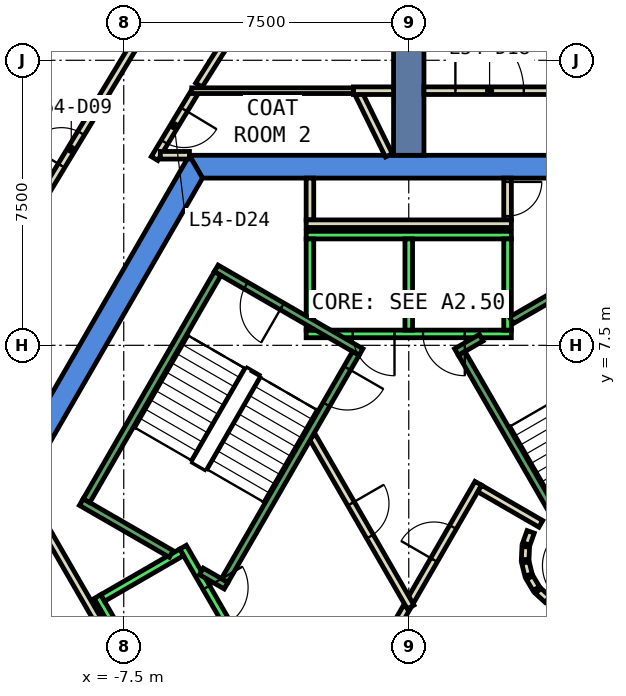
"""IFC4 building model, lengths in metres.
Left out: names, types, materials, properties, quantities, classifications, styles, units other than length and angle.
Written with IfcOpenShell. Run it as: python <this file> out.ifc"""

import sys

from ifc_helpers import new_model, si_unit, direction, frame, frame_2d, origin, place, context, subcontext, project, spatial, polyline, rectangle, outline, extrude, element, fill, save


model = new_model("IFC4")
c1 = context("Model", 3, precision=1e-05, world=origin(), true_north=direction((0.0, 1.0)))
c2 = subcontext(c1, "Body", "Model", "MODEL_VIEW")
j1 = project(units=[si_unit("LENGTHUNIT", "METRE"), si_unit("PLANEANGLEUNIT", "RADIAN")], contexts=[c1])
p1 = place(None, origin())
s1 = spatial("IfcSite", under=j1, at=p1, CompositionType="ELEMENT")
p2 = place(p1, origin())
s2 = spatial("IfcBuilding", under=s1, at=p2, CompositionType="ELEMENT")
p3 = place(p2, frame((0.0, 0.0, 241.4)))
s3 = spatial("IfcBuildingStorey", under=s2, at=p3, CompositionType="ELEMENT", Elevation=241.4)
p4 = place(p3, frame((0.0, 0.0, -0.6)))
e1 = element("IfcWall", 1, at=p4, inside=s3, PredefinedType="SHEAR", context=c2, shape_type="SweptSolid", body=[
    extrude(outline(polyline([(5.774, 12.5), (-5.774, 12.5), (-5.427, 11.9), (5.427, 11.9), (5.774, 12.5)])), origin(), (0.0, 0.0, 1.0), 3.86),
])
p5 = place(p3, frame((0.0, 0.0, -0.6)))
e2 = element("IfcWall", 2, at=p5, inside=s3, PredefinedType="SHEAR", context=c2, shape_type="SweptSolid", body=[
    extrude(outline(polyline([(-10.535, 4.253), (-10.015, 3.953), (-5.427, 11.9), (-5.774, 12.5), (-10.535, 4.253)])), origin(), (0.0, 0.0, 1.0), 3.86),
])
p6 = place(p3, frame((0.0, 0.0, -0.6)))
e3 = element("IfcWall", 3, at=p6, inside=s3, PredefinedType="SHEAR", context=c2, shape_type="SweptSolid", body=[
    extrude(outline(polyline([(-11.547, 2.5), (-5.774, -7.5), (-5.427, -6.9), (-10.854, 2.5), (-11.547, 2.5)])), origin(), (0.0, 0.0, 1.0), 3.86),
])
p7 = place(p3, frame((0.0, 12.5, -0.6), z_axis=(0.0, 0.0, 1.0), x_axis=(0.0, 1.0, 0.0)))
e4 = element("IfcWall", 4, at=p7, inside=s3, PredefinedType="SHEAR", context=c2, shape_type="SweptSolid", body=[
    extrude(rectangle(XDim=9.0, YDim=0.8, at=frame_2d((4.5, 0.0))), origin(), (0.0, 0.0, 1.0), 3.86),
])
p8 = place(p3, frame((-0.523, 12.5, 0.0), z_axis=(0.0, 0.0, 1.0), x_axis=(-0.440503659888, 0.897750814884, 0.0)))
e5 = element("IfcWall", 5, at=p8, inside=s3, PredefinedType="PARTITIONING", context=c2, shape_type="SweptSolid", body=[
    extrude(rectangle(XDim=1.793, YDim=0.2, at=frame_2d((0.897, 0.0))), origin(), (0.0, 0.0, 1.0), 3.26),
])
p9 = place(p3, frame((-5.65, 14.136, 0.0), z_axis=(0.0, 0.0, 1.0), x_axis=(-0.516869099034, -0.856064445275, 0.0)))
e6 = element("IfcWall", 6, at=p9, inside=s3, PredefinedType="PARTITIONING", context=c2, shape_type="SweptSolid", body=[
    extrude(rectangle(XDim=2.01, YDim=0.2, at=frame_2d((1.005, 0.0))), origin(), (0.0, 0.0, 1.0), 3.26),
])
p10 = place(p9, frame((0.505, 0.0, 0.0)))
e7 = element("IfcOpeningElement", 7, at=p10, cuts=e6, PredefinedType="OPENING", context=c2, shape_type="SweptSolid", body=[
    extrude(rectangle(XDim=1.0, YDim=2.1, at=frame_2d((0.5, 1.05))), frame((0.0, 0.11, 0.0), z_axis=(0.0, -1.0, 0.0), x_axis=(1.0, 0.0, 0.0)), (0.0, 0.0, 1.0), 0.22),
])
p11 = place(p3, frame((-6.537, 12.501, 0.0), z_axis=(0.0, 0.0, 1.0), x_axis=(1.0, 0.0, 0.0)))
e8 = element("IfcWall", 8, at=p11, inside=s3, PredefinedType="PARTITIONING", context=c2, shape_type="SweptSolid", body=[
    extrude(rectangle(XDim=0.766, YDim=0.2, at=frame_2d((0.383, 0.0))), origin(), (0.0, 0.0, 1.0), 3.26),
])
p12 = place(p3, frame((-1.457, 14.2, 0.0), z_axis=(0.0, 0.0, 1.0), x_axis=(1.0, 0.0, 0.0)))
e9 = element("IfcWall", 9, at=p12, inside=s3, PredefinedType="PARTITIONING", context=c2, shape_type="SweptSolid", body=[
    extrude(rectangle(XDim=1.057, YDim=0.2, at=frame_2d((0.529, 0.0))), origin(), (0.0, 0.0, 1.0), 3.26),
])
for number, where, z_axis, x_axis in (
    (10, (5.522, 14.348, 0.0), (0.0, 0.0, 1.0), (-0.534, 0.845, 0.0)),
    (11, (-2.516, 19.106, 0.0), (0.0, 0.0, 1.0), (-0.534, -0.845, 0.0)),
):
    element("IfcWall", number, at=place(p3, frame(where, z_axis=z_axis, x_axis=x_axis)), inside=s3, PredefinedType="PARTITIONING", context=c2, shape_type="SweptSolid", body=[
        extrude(rectangle(XDim=5.628, YDim=0.2, at=frame_2d((2.814, 0.0))), origin(), (0.0, 0.0, 1.0), 3.26),
    ])
p13 = place(p3, frame((-10.576, 9.849, 0.0), z_axis=(0.0, 0.0, 1.0), x_axis=(0.517026085378, 0.855969641423, 0.0)))
e12 = element("IfcWall", 12, at=p13, inside=s3, PredefinedType="PARTITIONING", context=c2, shape_type="SweptSolid", body=[
    extrude(rectangle(XDim=6.408, YDim=0.2, at=frame_2d((3.204, 0.0))), origin(), (0.0, 0.0, 1.0), 3.26),
])
p14 = place(p13, frame((2.779, 0.0, 0.0)))
e13 = element("IfcOpeningElement", 13, at=p14, cuts=e12, PredefinedType="OPENING", context=c2, shape_type="SweptSolid", body=[
    extrude(rectangle(XDim=1.0, YDim=2.1, at=frame_2d((0.5, 1.05))), frame((0.0, 0.11, 0.0), z_axis=(0.0, -1.0, 0.0), x_axis=(1.0, 0.0, 0.0)), (0.0, 0.0, 1.0), 0.22),
])
p15 = place(p3, frame((-2.6, 10.8, 0.0), z_axis=(0.0, 0.0, 1.0), x_axis=(0.0, 1.0, 0.0)))
e14 = element("IfcWall", 14, at=p15, inside=s3, PredefinedType="PARTITIONING", context=c2, shape_type="SweptSolid", body=[
    extrude(rectangle(XDim=1.1, YDim=0.2, at=frame_2d((0.55, 0.0))), origin(), (0.0, 0.0, 1.0), 3.26),
])
p16 = place(p3, frame((2.6, 11.9, 0.0), z_axis=(0.0, 0.0, 1.0), x_axis=(0.0, -1.0, 0.0)))
e15 = element("IfcWall", 15, at=p16, inside=s3, PredefinedType="PARTITIONING", context=c2, shape_type="SweptSolid", body=[
    extrude(rectangle(XDim=1.1, YDim=0.2, at=frame_2d((0.55, 0.0))), origin(), (0.0, 0.0, 1.0), 3.26),
])
p17 = place(p16, frame((0.1, 0.0, 0.0)))
e16 = element("IfcOpeningElement", 16, at=p17, cuts=e15, PredefinedType="OPENING", context=c2, shape_type="SweptSolid", body=[
    extrude(rectangle(XDim=0.9, YDim=2.1, at=frame_2d((0.45, 1.05))), frame((0.0, 0.11, 0.0), z_axis=(0.0, -1.0, 0.0), x_axis=(1.0, 0.0, 0.0)), (0.0, 0.0, 1.0), 0.22),
])
p18 = place(p3, frame((2.7, 10.7, 0.0), z_axis=(0.0, 0.0, 1.0), x_axis=(-1.0, 0.0, 0.0)))
e17 = element("IfcWall", 17, at=p18, inside=s3, PredefinedType="PARTITIONING", context=c2, shape_type="SweptSolid", body=[
    extrude(rectangle(XDim=5.4, YDim=0.2, at=frame_2d((2.7, 0.0))), origin(), (0.0, 0.0, 1.0), 3.26),
])
p19 = place(p3, frame((-9.751, 2.99, 0.0), z_axis=(0.0, 0.0, 1.0), x_axis=(0.500012163284, -0.866018381195, 0.0)))
e18 = element("IfcWall", 18, at=p19, inside=s3, PredefinedType="PARTITIONING", context=c2, shape_type="SweptSolid", body=[
    extrude(rectangle(XDim=8.0, YDim=0.2, at=frame_2d((4.0, 0.0))), origin(), (0.0, 0.0, 1.0), 3.26),
])
p20 = place(p3, frame((-1.457, 14.2, 0.0), z_axis=(0.0, 0.0, 1.0), x_axis=(-1.0, 0.0, 0.0)))
e19 = element("IfcWall", 19, at=p20, inside=s3, PredefinedType="PARTITIONING", context=c2, shape_type="SweptSolid", body=[
    extrude(rectangle(XDim=4.254, YDim=0.15, at=frame_2d((2.127, 0.0))), origin(), (0.0, 0.0, 1.0), 3.26),
])
p21 = place(p3, frame((-0.982, -1.0, 0.0), z_axis=(0.0, 0.0, 1.0), x_axis=(0.50024047865, 0.865886518847, 0.0)))
e20 = element("IfcWall", 20, at=p21, inside=s3, PredefinedType="PARTITIONING", context=c2, shape_type="SweptSolid", body=[
    extrude(rectangle(XDim=1.863, YDim=0.2, at=frame_2d((0.931, 0.0))), origin(), (0.0, 0.0, 1.0), 3.26),
])
p22 = place(p3, frame((0.05, 0.787, 0.0), z_axis=(0.0, 0.0, 1.0), x_axis=(0.499954076797, 0.866051915934, 0.0)))
e21 = element("IfcWall", 21, at=p22, inside=s3, PredefinedType="PARTITIONING", context=c2, shape_type="SweptSolid", body=[
    extrude(rectangle(XDim=3.558, YDim=0.2, at=frame_2d((1.779, 0.0))), origin(), (0.0, 0.0, 1.0), 3.26),
])
p23 = place(p22, frame((1.229, 0.0, 0.0)))
e22 = element("IfcOpeningElement", 22, at=p23, cuts=e21, PredefinedType="OPENING", context=c2, shape_type="SweptSolid", body=[
    extrude(rectangle(XDim=1.0, YDim=2.1, at=frame_2d((0.5, 1.05))), frame((0.0, 0.11, 0.0), z_axis=(0.0, -1.0, 0.0), x_axis=(1.0, 0.0, 0.0)), (0.0, 0.0, 1.0), 0.22),
])
p24 = place(p3, frame((1.866, 3.732, 0.0), z_axis=(0.0, 0.0, 1.0), x_axis=(0.866043361281, -0.499968895414, 0.0)))
e23 = element("IfcWall", 23, at=p24, inside=s3, PredefinedType="PARTITIONING", context=c2, shape_type="SweptSolid", body=[
    extrude(rectangle(XDim=1.858, YDim=0.2, at=frame_2d((0.929, 0.0))), origin(), (0.0, 0.0, 1.0), 3.26),
])
p25 = place(p3, frame((3.208, 2.592, 0.0), z_axis=(0.0, 0.0, 1.0), x_axis=(-0.337388820924, -0.941365382578, 0.0)))
e24 = element("IfcWall", 24, at=p25, inside=s3, PredefinedType="PARTITIONING", context=c2, shape_type="SweptSolid", body=[
    extrude(rectangle(XDim=0.338, YDim=0.2, at=frame_2d((0.169, 0.0))), origin(), (0.0, 0.0, 1.0), 3.26),
])
p26 = place(p3, frame((3.079, 2.199, 0.0), z_axis=(0.0, 0.0, 1.0), x_axis=(-0.047771483479, -0.998858290933, 0.0)))
e25 = element("IfcWall", 25, at=p26, inside=s3, PredefinedType="PARTITIONING", context=c2, shape_type="SweptSolid", body=[
    extrude(rectangle(XDim=0.337, YDim=0.2, at=frame_2d((0.169, 0.0))), origin(), (0.0, 0.0, 1.0), 3.26),
])
p27 = place(p3, frame((3.07, 1.786, 0.0), z_axis=(0.0, 0.0, 1.0), x_axis=(0.242705583207, -0.970099994784, 0.0)))
e26 = element("IfcWall", 26, at=p27, inside=s3, PredefinedType="PARTITIONING", context=c2, shape_type="SweptSolid", body=[
    extrude(rectangle(XDim=0.338, YDim=0.2, at=frame_2d((0.169, 0.0))), origin(), (0.0, 0.0, 1.0), 3.26),
])
for number, where, z_axis, x_axis in (
    (27, (3.182, 1.388, 0.0), (0.0, 0.0, 1.0), (0.512, -0.859, 0.0)),
    (28, (3.404, 1.039, 0.0), (0.0, 0.0, 1.0), (0.74, -0.672, 0.0)),
):
    element("IfcWall", number, at=place(p3, frame(where, z_axis=z_axis, x_axis=x_axis)), inside=s3, PredefinedType="PARTITIONING", context=c2, shape_type="SweptSolid", body=[
        extrude(rectangle(XDim=0.338, YDim=0.2, at=frame_2d((0.169, 0.0))), origin(), (0.0, 0.0, 1.0), 3.26),
    ])
p28 = place(p3, frame((-2.54, 5.1, 0.0), z_axis=(0.0, 0.0, 1.0), x_axis=(0.499925051871, -0.866068670783, 0.0)))
e29 = element("IfcWall", 29, at=p28, inside=s3, PredefinedType="PARTITIONING", context=c2, shape_type="SweptSolid", body=[
    extrude(rectangle(XDim=5.181, YDim=0.2, at=frame_2d((2.59, 0.0))), origin(), (0.0, 0.0, 1.0), 3.26),
])
p29 = place(p28, frame((2.04, 0.0, 0.0)))
e30 = element("IfcOpeningElement", 30, at=p29, cuts=e29, PredefinedType="OPENING", context=c2, shape_type="SweptSolid", body=[
    extrude(rectangle(XDim=1.0, YDim=2.1, at=frame_2d((0.5, 1.05))), frame((0.0, 0.11, 0.0), z_axis=(0.0, -1.0, 0.0), x_axis=(1.0, 0.0, 0.0)), (0.0, 0.0, 1.0), 0.22),
])
p30 = place(p3, frame((0.4, 14.2, 0.0), z_axis=(0.0, 0.0, 1.0), x_axis=(1.0, 0.0, 0.0)))
e31 = element("IfcWall", 31, at=p30, inside=s3, PredefinedType="PARTITIONING", context=c2, shape_type="SweptSolid", body=[
    extrude(rectangle(XDim=5.311, YDim=0.2, at=frame_2d((2.656, 0.0))), origin(), (0.0, 0.0, 1.0), 3.26),
])
p31 = place(p30, frame((0.827, 0.0, 0.0)))
e32 = element("IfcOpeningElement", 32, at=p31, cuts=e31, PredefinedType="OPENING", context=c2, shape_type="SweptSolid", body=[
    extrude(rectangle(XDim=1.8, YDim=2.1, at=frame_2d((0.9, 1.05))), frame((0.0, 0.11, 0.0), z_axis=(0.0, -1.0, 0.0), x_axis=(1.0, 0.0, 0.0)), (0.0, 0.0, 1.0), 0.22),
])
p32 = place(p3, frame((2.7, 7.8, 0.0), z_axis=(0.0, 0.0, 1.0), x_axis=(-1.0, 0.0, 0.0)))
e33 = element("IfcWall", 33, at=p32, inside=s3, PredefinedType="STANDARD", context=c2, shape_type="SweptSolid", body=[
    extrude(rectangle(XDim=5.4, YDim=0.2, at=frame_2d((2.7, 0.0))), origin(), (0.0, 0.0, 1.0), 3.26),
])
p33 = place(p32, frame((1.225, 0.0, 0.0)))
e34 = element("IfcOpeningElement", 34, at=p33, cuts=e33, PredefinedType="OPENING", context=c2, shape_type="SweptSolid", body=[
    extrude(rectangle(XDim=1.1, YDim=2.1, at=frame_2d((0.55, 1.05))), frame((0.0, 0.11, 0.0), z_axis=(0.0, -1.0, 0.0), x_axis=(1.0, 0.0, 0.0)), (0.0, 0.0, 1.0), 0.22),
])
p34 = place(p32, frame((3.075, 0.0, 0.0)))
e35 = element("IfcOpeningElement", 35, at=p34, cuts=e33, PredefinedType="OPENING", context=c2, shape_type="SweptSolid", body=[
    extrude(rectangle(XDim=1.1, YDim=2.1, at=frame_2d((0.55, 1.05))), frame((0.0, 0.11, 0.0), z_axis=(0.0, -1.0, 0.0), x_axis=(1.0, 0.0, 0.0)), (0.0, 0.0, 1.0), 0.22),
])
p35 = place(p3, frame((2.7, 10.4, 0.0), z_axis=(0.0, 0.0, 1.0), x_axis=(-1.0, 0.0, 0.0)))
e36 = element("IfcWall", 36, at=p35, inside=s3, PredefinedType="STANDARD", context=c2, shape_type="SweptSolid", body=[
    extrude(rectangle(XDim=5.4, YDim=0.2, at=frame_2d((2.7, 0.0))), origin(), (0.0, 0.0, 1.0), 3.26),
])
for number, where, z_axis, x_axis in (
    (37, (2.6, 7.9, 0.0), (0.0, 0.0, 1.0), (0.0, 1.0, 0.0)),
    (38, (0.0, 7.9, 0.0), (0.0, 0.0, 1.0), (0.0, 1.0, 0.0)),
    (39, (-2.6, 7.9, 0.0), (0.0, 0.0, 1.0), (0.0, 1.0, 0.0)),
):
    element("IfcWall", number, at=place(p3, frame(where, z_axis=z_axis, x_axis=x_axis)), inside=s3, PredefinedType="STANDARD", context=c2, shape_type="SweptSolid", body=[
        extrude(rectangle(XDim=2.4, YDim=0.2, at=frame_2d((1.2, 0.0))), origin(), (0.0, 0.0, 1.0), 3.26),
    ])
p36 = place(p3, frame((-5.94, 2.188, 0.0), z_axis=(0.0, 0.0, 1.0), x_axis=(0.500034260056, -0.866005622828, 0.0)))
e40 = element("IfcWall", 40, at=p36, inside=s3, PredefinedType="STANDARD", context=c2, shape_type="SweptSolid", body=[
    extrude(rectangle(XDim=5.399, YDim=0.2, at=frame_2d((2.7, 0.0))), origin(), (0.0, 0.0, 1.0), 3.26),
])
p37 = place(p36, frame((3.075, 0.0, 0.0)))
e41 = element("IfcOpeningElement", 41, at=p37, cuts=e40, PredefinedType="OPENING", context=c2, shape_type="SweptSolid", body=[
    extrude(rectangle(XDim=1.1, YDim=2.1, at=frame_2d((0.55, 1.05))), frame((0.0, 0.11, 0.0), z_axis=(0.0, -1.0, 0.0), x_axis=(1.0, 0.0, 0.0)), (0.0, 0.0, 1.0), 0.22),
])
p38 = place(p36, frame((1.225, 0.0, 0.0)))
e42 = element("IfcOpeningElement", 42, at=p38, cuts=e40, PredefinedType="OPENING", context=c2, shape_type="SweptSolid", body=[
    extrude(rectangle(XDim=1.1, YDim=2.1, at=frame_2d((0.55, 1.05))), frame((0.0, 0.11, 0.0), z_axis=(0.0, -1.0, 0.0), x_axis=(1.0, 0.0, 0.0)), (0.0, 0.0, 1.0), 0.22),
])
p39 = place(p3, frame((-8.192, 0.888, 0.0), z_axis=(0.0, 0.0, 1.0), x_axis=(0.500034260056, -0.866005622828, 0.0)))
e43 = element("IfcWall", 43, at=p39, inside=s3, PredefinedType="STANDARD", context=c2, shape_type="SweptSolid", body=[
    extrude(rectangle(XDim=5.399, YDim=0.2, at=frame_2d((2.7, 0.0))), origin(), (0.0, 0.0, 1.0), 3.26),
])
p40 = place(p3, frame((-5.977, 2.052, 0.0), z_axis=(0.0, 0.0, 1.0), x_axis=(-0.865973769406, -0.500089422704, 0.0)))
e44 = element("IfcWall", 44, at=p40, inside=s3, PredefinedType="STANDARD", context=c2, shape_type="SweptSolid", body=[
    extrude(rectangle(XDim=2.399, YDim=0.2, at=frame_2d((1.2, 0.0))), origin(), (0.0, 0.0, 1.0), 3.26),
])
p41 = place(p3, frame((3.24, -2.488, 0.0), z_axis=(0.0, 0.0, 1.0), x_axis=(0.500034260056, 0.866005622828, 0.0)))
e45 = element("IfcWall", 45, at=p41, inside=s3, PredefinedType="STANDARD", context=c2, shape_type="SweptSolid", body=[
    extrude(rectangle(XDim=5.399, YDim=0.2, at=frame_2d((2.7, 0.0))), origin(), (0.0, 0.0, 1.0), 3.26),
])
p42 = place(p41, frame((3.225, 0.0, 0.0)))
e46 = element("IfcOpeningElement", 46, at=p42, cuts=e45, PredefinedType="OPENING", context=c2, shape_type="SweptSolid", body=[
    extrude(rectangle(XDim=1.1, YDim=2.1, at=frame_2d((0.55, 1.05))), frame((0.0, 0.11, 0.0), z_axis=(0.0, -1.0, 0.0), x_axis=(1.0, 0.0, 0.0)), (0.0, 0.0, 1.0), 0.22),
])
p43 = place(p41, frame((1.225, 0.0, 0.0)))
e47 = element("IfcOpeningElement", 47, at=p43, cuts=e45, PredefinedType="OPENING", context=c2, shape_type="SweptSolid", body=[
    extrude(rectangle(XDim=1.1, YDim=2.1, at=frame_2d((0.55, 1.05))), frame((0.0, 0.11, 0.0), z_axis=(0.0, -1.0, 0.0), x_axis=(1.0, 0.0, 0.0)), (0.0, 0.0, 1.0), 0.22),
])
p44 = place(p3, frame((2.7, 8.158, 0.0), z_axis=(0.0, 0.0, 1.0), x_axis=(0.86611865017, 0.499838457731, 0.0)))
e48 = element("IfcWall", 48, at=p44, inside=s3, PredefinedType="STANDARD", context=c2, shape_type="SweptSolid", body=[
    extrude(rectangle(XDim=2.733, YDim=0.2, at=frame_2d((1.366, 0.0))), origin(), (0.0, 0.0, 1.0), 3.26),
])
p45 = place(p3, frame((1.256, 7.324, 0.0), z_axis=(0.0, 0.0, 1.0), x_axis=(0.865915093549, 0.500191014278, 0.0)))
e49 = element("IfcWall", 49, at=p45, inside=s3, PredefinedType="STANDARD", context=c2, shape_type="SweptSolid", body=[
    extrude(rectangle(XDim=0.752, YDim=0.2, at=frame_2d((0.376, 0.0))), origin(), (0.0, 0.0, 1.0), 3.26),
])
p46 = place(p3, frame((4.843, 1.312, 0.0), z_axis=(0.0, 0.0, 1.0), x_axis=(-0.499963383562, 0.866046543262, 0.0)))
e50 = element("IfcWall", 50, at=p46, inside=s3, PredefinedType="STANDARD", context=c2, shape_type="SweptSolid", body=[
    extrude(rectangle(XDim=6.9, YDim=0.2, at=frame_2d((3.45, 0.0))), origin(), (0.0, 0.0, 1.0), 3.26),
])
p47 = place(p46, frame((0.45, 0.0, 0.0)))
e51 = element("IfcOpeningElement", 51, at=p47, cuts=e50, PredefinedType="OPENING", context=c2, shape_type="SweptSolid", body=[
    extrude(rectangle(XDim=1.1, YDim=2.2, at=frame_2d((0.55, 1.1))), frame((0.0, 0.11, 0.0), z_axis=(0.0, -1.0, 0.0), x_axis=(1.0, 0.0, 0.0)), (0.0, 0.0, 1.0), 0.22),
])
p48 = place(p3, frame((-1.256, 7.324, 0.0), z_axis=(0.0, 0.0, 1.0), x_axis=(-0.866046073146, 0.499964197906, 0.0)))
e52 = element("IfcWall", 52, at=p48, inside=s3, PredefinedType="STANDARD", context=c2, shape_type="SweptSolid", body=[
    extrude(rectangle(XDim=4.4, YDim=0.2, at=frame_2d((2.2, 0.0))), origin(), (0.0, 0.0, 1.0), 3.26),
])
p49 = place(p48, frame((2.4, 0.0, 0.0)))
e53 = element("IfcOpeningElement", 53, at=p49, cuts=e52, PredefinedType="OPENING", context=c2, shape_type="SweptSolid", body=[
    extrude(rectangle(XDim=1.1, YDim=2.2, at=frame_2d((0.55, 1.1))), frame((0.0, 0.11, 0.0), z_axis=(0.0, -1.0, 0.0), x_axis=(1.0, 0.0, 0.0)), (0.0, 0.0, 1.0), 0.22),
])
p50 = place(p3, frame((-6.25, 2.01, 0.0), z_axis=(0.0, 0.0, 1.0), x_axis=(-0.86611865017, 0.499838457731, 0.0)))
e54 = element("IfcWall", 54, at=p50, inside=s3, PredefinedType="STANDARD", context=c2, shape_type="SweptSolid", body=[
    extrude(rectangle(XDim=2.733, YDim=0.2, at=frame_2d((1.366, 0.0))), origin(), (0.0, 0.0, 1.0), 3.26),
])
p51 = place(p3, frame((-4.806, 1.176, 0.0), z_axis=(0.0, 0.0, 1.0), x_axis=(-0.866558586415, 0.499075361355, 0.0)))
e55 = element("IfcWall", 55, at=p51, inside=s3, PredefinedType="STANDARD", context=c2, shape_type="SweptSolid", body=[
    extrude(rectangle(XDim=0.751, YDim=0.2, at=frame_2d((0.376, 0.0))), origin(), (0.0, 0.0, 1.0), 3.26),
])
p52 = place(p3, frame((-1.393, 7.288, 0.0), z_axis=(0.0, 0.0, 1.0), x_axis=(-0.499963383562, -0.866046543262, 0.0)))
e56 = element("IfcWall", 56, at=p52, inside=s3, PredefinedType="STANDARD", context=c2, shape_type="SweptSolid", body=[
    extrude(rectangle(XDim=6.9, YDim=0.2, at=frame_2d((3.45, 0.0))), origin(), (0.0, 0.0, 1.0), 3.26),
])
p53 = place(p52, frame((0.45, 0.0, 0.0)))
e57 = element("IfcOpeningElement", 57, at=p53, cuts=e56, PredefinedType="OPENING", context=c2, shape_type="SweptSolid", body=[
    extrude(rectangle(XDim=1.1, YDim=2.2, at=frame_2d((0.55, 1.1))), frame((0.0, 0.11, 0.0), z_axis=(0.0, -1.0, 0.0), x_axis=(1.0, 0.0, 0.0)), (0.0, 0.0, 1.0), 0.22),
])
p54 = place(p3, frame((-5.03, 9.388, 0.0), z_axis=(0.0, 0.0, 1.0), x_axis=(-0.499978703459, -0.866037698999, 0.0)))
e58 = element("IfcWall", 58, at=p54, inside=s3, PredefinedType="STANDARD", context=c2, shape_type="SweptSolid", body=[
    extrude(rectangle(XDim=6.9, YDim=0.2, at=frame_2d((3.45, 0.0))), origin(), (0.0, 0.0, 1.0), 3.26),
])
p55 = place(p14, origin())
e59 = element("IfcDoor", 59, at=p55, inside=s3, OperationType="SINGLE_SWING_LEFT", PredefinedType="DOOR", context=c2, shape_type="SweptSolid", body=[
    extrude(rectangle(XDim=1.0, YDim=2.1, at=frame_2d((0.5, 1.05))), frame((0.0, 0.025, 0.0), z_axis=(0.0, -1.0, 0.0), x_axis=(1.0, 0.0, 0.0)), (0.0, 0.0, 1.0), 0.05),
])
fill(e13, e59)
p56 = place(p31, origin())
e60 = element("IfcDoor", 60, at=p56, inside=s3, OperationType="DOUBLE_DOOR_SINGLE_SWING", PredefinedType="DOOR", context=c2, shape_type="SweptSolid", body=[
    extrude(rectangle(XDim=1.8, YDim=2.1, at=frame_2d((0.9, 1.05))), frame((0.0, 0.025, 0.0), z_axis=(0.0, -1.0, 0.0), x_axis=(1.0, 0.0, 0.0)), (0.0, 0.0, 1.0), 0.05),
])
fill(e32, e60)
p57 = place(p10, origin())
e61 = element("IfcDoor", 61, at=p57, inside=s3, OperationType="SINGLE_SWING_LEFT", PredefinedType="DOOR", context=c2, shape_type="SweptSolid", body=[
    extrude(rectangle(XDim=1.0, YDim=2.1, at=frame_2d((0.5, 1.05))), frame((0.0, 0.025, 0.0), z_axis=(0.0, -1.0, 0.0), x_axis=(1.0, 0.0, 0.0)), (0.0, 0.0, 1.0), 0.05),
])
fill(e7, e61)
p58 = place(p23, origin())
e62 = element("IfcDoor", 62, at=p58, inside=s3, OperationType="SINGLE_SWING_RIGHT", PredefinedType="DOOR", context=c2, shape_type="SweptSolid", body=[
    extrude(rectangle(XDim=1.0, YDim=2.1, at=frame_2d((0.5, 1.05))), frame((0.0, 0.025, 0.0), z_axis=(0.0, -1.0, 0.0), x_axis=(1.0, 0.0, 0.0)), (0.0, 0.0, 1.0), 0.05),
])
fill(e22, e62)
p59 = place(p29, origin())
e63 = element("IfcDoor", 63, at=p59, inside=s3, OperationType="SINGLE_SWING_RIGHT", PredefinedType="DOOR", context=c2, shape_type="SweptSolid", body=[
    extrude(rectangle(XDim=1.0, YDim=2.1, at=frame_2d((0.5, 1.05))), frame((0.0, 0.025, 0.0), z_axis=(0.0, -1.0, 0.0), x_axis=(1.0, 0.0, 0.0)), (0.0, 0.0, 1.0), 0.05),
])
fill(e30, e63)
p60 = place(p17, origin())
e64 = element("IfcDoor", 64, at=p60, inside=s3, OperationType="SINGLE_SWING_LEFT", PredefinedType="DOOR", context=c2, shape_type="SweptSolid", body=[
    extrude(rectangle(XDim=0.9, YDim=2.1, at=frame_2d((0.45, 1.05))), frame((0.0, 0.025, 0.0), z_axis=(0.0, -1.0, 0.0), x_axis=(1.0, 0.0, 0.0)), (0.0, 0.0, 1.0), 0.05),
])
fill(e16, e64)
p61 = place(p33, origin())
e65 = element("IfcDoor", 65, at=p61, inside=s3, OperationType="SLIDING_TO_LEFT", PredefinedType="DOOR", context=c2, shape_type="SweptSolid", body=[
    extrude(rectangle(XDim=1.1, YDim=2.1, at=frame_2d((0.55, 1.05))), frame((0.0, 0.025, 0.0), z_axis=(0.0, -1.0, 0.0), x_axis=(1.0, 0.0, 0.0)), (0.0, 0.0, 1.0), 0.05),
])
fill(e34, e65)
p62 = place(p34, origin())
e66 = element("IfcDoor", 66, at=p62, inside=s3, OperationType="SLIDING_TO_LEFT", PredefinedType="DOOR", context=c2, shape_type="SweptSolid", body=[
    extrude(rectangle(XDim=1.1, YDim=2.1, at=frame_2d((0.55, 1.05))), frame((0.0, 0.025, 0.0), z_axis=(0.0, -1.0, 0.0), x_axis=(1.0, 0.0, 0.0)), (0.0, 0.0, 1.0), 0.05),
])
fill(e35, e66)
p63 = place(p38, origin())
e67 = element("IfcDoor", 67, at=p63, inside=s3, OperationType="SLIDING_TO_LEFT", PredefinedType="DOOR", context=c2, shape_type="SweptSolid", body=[
    extrude(rectangle(XDim=1.1, YDim=2.1, at=frame_2d((0.55, 1.05))), frame((0.0, 0.025, 0.0), z_axis=(0.0, -1.0, 0.0), x_axis=(1.0, 0.0, 0.0)), (0.0, 0.0, 1.0), 0.05),
])
fill(e42, e67)
p64 = place(p53, origin())
e68 = element("IfcDoor", 68, at=p64, inside=s3, OperationType="SINGLE_SWING_LEFT", PredefinedType="DOOR", context=c2, shape_type="SweptSolid", body=[
    extrude(rectangle(XDim=1.1, YDim=2.2, at=frame_2d((0.55, 1.1))), frame((0.0, 0.025, 0.0), z_axis=(0.0, -1.0, 0.0), x_axis=(1.0, 0.0, 0.0)), (0.0, 0.0, 1.0), 0.05),
])
fill(e57, e68)
p65 = place(p49, origin())
e69 = element("IfcDoor", 69, at=p65, inside=s3, OperationType="SINGLE_SWING_LEFT", PredefinedType="DOOR", context=c2, shape_type="SweptSolid", body=[
    extrude(rectangle(XDim=1.1, YDim=2.2, at=frame_2d((0.55, 1.1))), frame((0.0, 0.025, 0.0), z_axis=(0.0, -1.0, 0.0), x_axis=(1.0, 0.0, 0.0)), (0.0, 0.0, 1.0), 0.05),
])
fill(e53, e69)
save(model, sys.argv[1])
